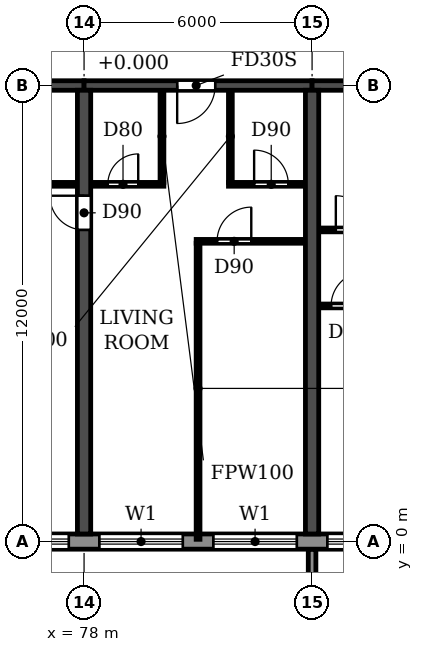
"""IFC4 building model, lengths in metres.
Left out: names, types, materials, properties, quantities, classifications, styles, units other than length and angle.
Written with IfcOpenShell. Run it as: python <this file> out.ifc"""

import sys

from ifc_helpers import new_model, si_unit, direction, frame, frame_2d, origin, place, context, subcontext, project, spatial, polyline, rectangle, outline, extrude, source, transform, mapped, element, fill, save


model = new_model("IFC4")
c1 = context("Model", 3, precision=1e-05, world=origin(), true_north=direction((0.0, 1.0)))
c2 = subcontext(c1, "Body", "Model", "MODEL_VIEW")
j1 = project(units=[si_unit("LENGTHUNIT", "METRE"), si_unit("PLANEANGLEUNIT", "RADIAN")], contexts=[c1])
p1 = place(None, origin())
s1 = spatial("IfcSite", under=j1, at=p1, CompositionType="ELEMENT")
p2 = place(p1, origin())
s2 = spatial("IfcBuilding", under=s1, at=p2, CompositionType="ELEMENT")
p3 = place(p2, frame((0.0, 0.0, 102.6)))
s3 = spatial("IfcBuildingStorey", under=s2, at=p3, CompositionType="ELEMENT", Elevation=102.6)
p4 = place(p3, frame((78.0, 0.2, 0.0), z_axis=(0.0, 0.0, 1.0), x_axis=(0.0, 1.0, 0.0)))
e1 = element("IfcWall", 1, at=p4, inside=s3, PredefinedType="SHEAR", context=c2, shape_type="SweptSolid", body=[
    extrude(rectangle(XDim=11.675, YDim=0.35, at=frame_2d((5.837, 0.0))), origin(), (0.0, 0.0, 1.0), 3.0),
])
p5 = place(p4, frame((8.0, 0.0, 0.0)))
e2 = element("IfcOpeningElement", 2, at=p5, cuts=e1, PredefinedType="OPENING", context=c2, shape_type="SweptSolid", body=[
    extrude(rectangle(XDim=0.9, YDim=2.1, at=frame_2d((0.45, 1.05))), frame((0.0, 0.185, 0.0), z_axis=(0.0, -1.0, 0.0), x_axis=(1.0, 0.0, 0.0)), (0.0, 0.0, 1.0), 0.37),
])
p6 = place(p3, frame((84.0, 0.2, 0.0), z_axis=(0.0, 0.0, 1.0), x_axis=(0.0, 1.0, 0.0)))
e3 = element("IfcWall", 3, at=p6, inside=s3, PredefinedType="SHEAR", context=c2, shape_type="SweptSolid", body=[
    extrude(rectangle(XDim=11.675, YDim=0.35, at=frame_2d((5.837, 0.0))), origin(), (0.0, 0.0, 1.0), 3.0),
])
p7 = place(p3, frame((72.0, 12.0, 0.0), z_axis=(0.0, 0.0, 1.0), x_axis=(1.0, 0.0, 0.0)))
e4 = element("IfcWall", 4, at=p7, inside=s3, PredefinedType="SHEAR", context=c2, shape_type="SweptSolid", body=[
    extrude(rectangle(XDim=6.0, YDim=0.25, at=frame_2d((3.0, 0.0))), origin(), (0.0, 0.0, 1.0), 2.4),
])
p8 = place(p3, frame((78.0, 12.0, 0.0), z_axis=(0.0, 0.0, 1.0), x_axis=(1.0, 0.0, 0.0)))
e5 = element("IfcWall", 5, at=p8, inside=s3, PredefinedType="SHEAR", context=c2, shape_type="SweptSolid", body=[
    extrude(rectangle(XDim=6.0, YDim=0.25, at=frame_2d((3.0, 0.0))), origin(), (0.0, 0.0, 1.0), 2.4),
])
p9 = place(p8, frame((2.45, 0.0, 0.0)))
e6 = element("IfcOpeningElement", 6, at=p9, cuts=e5, PredefinedType="OPENING", context=c2, shape_type="SweptSolid", body=[
    extrude(rectangle(XDim=1.0, YDim=2.1, at=frame_2d((0.5, 1.05))), frame((0.0, 0.135, 0.0), z_axis=(0.0, -1.0, 0.0), x_axis=(1.0, 0.0, 0.0)), (0.0, 0.0, 1.0), 0.27),
])
p10 = place(p3, frame((84.0, 12.0, 0.0), z_axis=(0.0, 0.0, 1.0), x_axis=(1.0, 0.0, 0.0)))
e7 = element("IfcWall", 7, at=p10, inside=s3, PredefinedType="SHEAR", context=c2, shape_type="SweptSolid", body=[
    extrude(rectangle(XDim=6.0, YDim=0.25, at=frame_2d((3.0, 0.0))), origin(), (0.0, 0.0, 1.0), 2.4),
])
p11 = place(p10, frame((2.55, 0.0, 0.0)))
e8 = element("IfcOpeningElement", 8, at=p11, cuts=e7, PredefinedType="OPENING", context=c2, shape_type="SweptSolid", body=[
    extrude(rectangle(XDim=1.0, YDim=2.1, at=frame_2d((0.5, 1.05))), frame((0.0, 0.135, 0.0), z_axis=(0.0, -1.0, 0.0), x_axis=(1.0, 0.0, 0.0)), (0.0, 0.0, 1.0), 0.27),
])
p12 = place(p3, frame((10.683, 0.0, 0.0), z_axis=(0.0, 0.0, 1.0), x_axis=(1.0, 0.0, 0.0)))
e9 = element("IfcWall", 9, at=p12, inside=s3, PredefinedType="STANDARD", context=c2, shape_type="SweptSolid", body=[
    extrude(rectangle(XDim=80.634, YDim=0.4, at=frame_2d((40.317, 0.0))), origin(), (0.0, 0.0, 1.0), 3.0),
])
p13 = place(p12, frame((1.717, 0.0, 0.9)))
e10 = element("IfcOpeningElement", 10, at=p13, cuts=e9, PredefinedType="OPENING", context=c2, shape_type="SweptSolid", body=[
    extrude(rectangle(XDim=2.2, YDim=1.5, at=frame_2d((1.1, 0.75))), frame((0.0, 0.21, 0.0), z_axis=(0.0, -1.0, 0.0), x_axis=(1.0, 0.0, 0.0)), (0.0, 0.0, 1.0), 0.42),
])
p14 = place(p12, frame((4.917, 0.0, 0.0)))
e11 = element("IfcOpeningElement", 11, at=p14, cuts=e9, PredefinedType="OPENING", context=c2, shape_type="SweptSolid", body=[
    extrude(rectangle(XDim=1.8, YDim=2.4, at=frame_2d((0.9, 1.2))), frame((0.0, 0.21, 0.0), z_axis=(0.0, -1.0, 0.0), x_axis=(1.0, 0.0, 0.0)), (0.0, 0.0, 1.0), 0.42),
])
p15 = place(p12, frame((7.717, 0.0, 0.9)))
e12 = element("IfcOpeningElement", 12, at=p15, cuts=e9, PredefinedType="OPENING", context=c2, shape_type="SweptSolid", body=[
    extrude(rectangle(XDim=2.2, YDim=1.5, at=frame_2d((1.1, 0.75))), frame((0.0, 0.21, 0.0), z_axis=(0.0, -1.0, 0.0), x_axis=(1.0, 0.0, 0.0)), (0.0, 0.0, 1.0), 0.42),
])
p16 = place(p12, frame((10.717, 0.0, 0.9)))
e13 = element("IfcOpeningElement", 13, at=p16, cuts=e9, PredefinedType="OPENING", context=c2, shape_type="SweptSolid", body=[
    extrude(rectangle(XDim=2.2, YDim=1.5, at=frame_2d((1.1, 0.75))), frame((0.0, 0.21, 0.0), z_axis=(0.0, -1.0, 0.0), x_axis=(1.0, 0.0, 0.0)), (0.0, 0.0, 1.0), 0.42),
])
p17 = place(p12, frame((13.717, 0.0, 0.9)))
e14 = element("IfcOpeningElement", 14, at=p17, cuts=e9, PredefinedType="OPENING", context=c2, shape_type="SweptSolid", body=[
    extrude(rectangle(XDim=2.2, YDim=1.5, at=frame_2d((1.1, 0.75))), frame((0.0, 0.21, 0.0), z_axis=(0.0, -1.0, 0.0), x_axis=(1.0, 0.0, 0.0)), (0.0, 0.0, 1.0), 0.42),
])
p18 = place(p12, frame((16.717, 0.0, 0.9)))
e15 = element("IfcOpeningElement", 15, at=p18, cuts=e9, PredefinedType="OPENING", context=c2, shape_type="SweptSolid", body=[
    extrude(rectangle(XDim=2.2, YDim=1.5, at=frame_2d((1.1, 0.75))), frame((0.0, 0.21, 0.0), z_axis=(0.0, -1.0, 0.0), x_axis=(1.0, 0.0, 0.0)), (0.0, 0.0, 1.0), 0.42),
])
p19 = place(p12, frame((19.717, 0.0, 0.9)))
e16 = element("IfcOpeningElement", 16, at=p19, cuts=e9, PredefinedType="OPENING", context=c2, shape_type="SweptSolid", body=[
    extrude(rectangle(XDim=2.2, YDim=1.5, at=frame_2d((1.1, 0.75))), frame((0.0, 0.21, 0.0), z_axis=(0.0, -1.0, 0.0), x_axis=(1.0, 0.0, 0.0)), (0.0, 0.0, 1.0), 0.42),
])
p20 = place(p12, frame((22.717, 0.0, 0.9)))
e17 = element("IfcOpeningElement", 17, at=p20, cuts=e9, PredefinedType="OPENING", context=c2, shape_type="SweptSolid", body=[
    extrude(rectangle(XDim=2.2, YDim=1.5, at=frame_2d((1.1, 0.75))), frame((0.0, 0.21, 0.0), z_axis=(0.0, -1.0, 0.0), x_axis=(1.0, 0.0, 0.0)), (0.0, 0.0, 1.0), 0.42),
])
p21 = place(p12, frame((25.717, 0.0, 0.9)))
e18 = element("IfcOpeningElement", 18, at=p21, cuts=e9, PredefinedType="OPENING", context=c2, shape_type="SweptSolid", body=[
    extrude(rectangle(XDim=2.2, YDim=1.5, at=frame_2d((1.1, 0.75))), frame((0.0, 0.21, 0.0), z_axis=(0.0, -1.0, 0.0), x_axis=(1.0, 0.0, 0.0)), (0.0, 0.0, 1.0), 0.42),
])
p22 = place(p12, frame((28.917, 0.0, 0.0)))
e19 = element("IfcOpeningElement", 19, at=p22, cuts=e9, PredefinedType="OPENING", context=c2, shape_type="SweptSolid", body=[
    extrude(rectangle(XDim=1.8, YDim=2.4, at=frame_2d((0.9, 1.2))), frame((0.0, 0.21, 0.0), z_axis=(0.0, -1.0, 0.0), x_axis=(1.0, 0.0, 0.0)), (0.0, 0.0, 1.0), 0.42),
])
p23 = place(p12, frame((31.717, 0.0, 0.9)))
e20 = element("IfcOpeningElement", 20, at=p23, cuts=e9, PredefinedType="OPENING", context=c2, shape_type="SweptSolid", body=[
    extrude(rectangle(XDim=2.2, YDim=1.5, at=frame_2d((1.1, 0.75))), frame((0.0, 0.21, 0.0), z_axis=(0.0, -1.0, 0.0), x_axis=(1.0, 0.0, 0.0)), (0.0, 0.0, 1.0), 0.42),
])
p24 = place(p12, frame((34.717, 0.0, 0.9)))
e21 = element("IfcOpeningElement", 21, at=p24, cuts=e9, PredefinedType="OPENING", context=c2, shape_type="SweptSolid", body=[
    extrude(rectangle(XDim=2.2, YDim=1.5, at=frame_2d((1.1, 0.75))), frame((0.0, 0.21, 0.0), z_axis=(0.0, -1.0, 0.0), x_axis=(1.0, 0.0, 0.0)), (0.0, 0.0, 1.0), 0.42),
])
p25 = place(p12, frame((37.717, 0.0, 0.9)))
e22 = element("IfcOpeningElement", 22, at=p25, cuts=e9, PredefinedType="OPENING", context=c2, shape_type="SweptSolid", body=[
    extrude(rectangle(XDim=2.2, YDim=1.5, at=frame_2d((1.1, 0.75))), frame((0.0, 0.21, 0.0), z_axis=(0.0, -1.0, 0.0), x_axis=(1.0, 0.0, 0.0)), (0.0, 0.0, 1.0), 0.42),
])
p26 = place(p12, frame((40.717, 0.0, 0.9)))
e23 = element("IfcOpeningElement", 23, at=p26, cuts=e9, PredefinedType="OPENING", context=c2, shape_type="SweptSolid", body=[
    extrude(rectangle(XDim=2.2, YDim=1.5, at=frame_2d((1.1, 0.75))), frame((0.0, 0.21, 0.0), z_axis=(0.0, -1.0, 0.0), x_axis=(1.0, 0.0, 0.0)), (0.0, 0.0, 1.0), 0.42),
])
p27 = place(p12, frame((43.717, 0.0, 0.9)))
e24 = element("IfcOpeningElement", 24, at=p27, cuts=e9, PredefinedType="OPENING", context=c2, shape_type="SweptSolid", body=[
    extrude(rectangle(XDim=2.2, YDim=1.5, at=frame_2d((1.1, 0.75))), frame((0.0, 0.21, 0.0), z_axis=(0.0, -1.0, 0.0), x_axis=(1.0, 0.0, 0.0)), (0.0, 0.0, 1.0), 0.42),
])
p28 = place(p12, frame((46.717, 0.0, 0.9)))
e25 = element("IfcOpeningElement", 25, at=p28, cuts=e9, PredefinedType="OPENING", context=c2, shape_type="SweptSolid", body=[
    extrude(rectangle(XDim=2.2, YDim=1.5, at=frame_2d((1.1, 0.75))), frame((0.0, 0.21, 0.0), z_axis=(0.0, -1.0, 0.0), x_axis=(1.0, 0.0, 0.0)), (0.0, 0.0, 1.0), 0.42),
])
p29 = place(p12, frame((49.917, 0.0, 0.0)))
e26 = element("IfcOpeningElement", 26, at=p29, cuts=e9, PredefinedType="OPENING", context=c2, shape_type="SweptSolid", body=[
    extrude(rectangle(XDim=1.8, YDim=2.4, at=frame_2d((0.9, 1.2))), frame((0.0, 0.21, 0.0), z_axis=(0.0, -1.0, 0.0), x_axis=(1.0, 0.0, 0.0)), (0.0, 0.0, 1.0), 0.42),
])
p30 = place(p12, frame((52.717, 0.0, 0.9)))
e27 = element("IfcOpeningElement", 27, at=p30, cuts=e9, PredefinedType="OPENING", context=c2, shape_type="SweptSolid", body=[
    extrude(rectangle(XDim=2.2, YDim=1.5, at=frame_2d((1.1, 0.75))), frame((0.0, 0.21, 0.0), z_axis=(0.0, -1.0, 0.0), x_axis=(1.0, 0.0, 0.0)), (0.0, 0.0, 1.0), 0.42),
])
p31 = place(p12, frame((55.717, 0.0, 0.9)))
e28 = element("IfcOpeningElement", 28, at=p31, cuts=e9, PredefinedType="OPENING", context=c2, shape_type="SweptSolid", body=[
    extrude(rectangle(XDim=2.2, YDim=1.5, at=frame_2d((1.1, 0.75))), frame((0.0, 0.21, 0.0), z_axis=(0.0, -1.0, 0.0), x_axis=(1.0, 0.0, 0.0)), (0.0, 0.0, 1.0), 0.42),
])
p32 = place(p12, frame((58.717, 0.0, 0.9)))
e29 = element("IfcOpeningElement", 29, at=p32, cuts=e9, PredefinedType="OPENING", context=c2, shape_type="SweptSolid", body=[
    extrude(rectangle(XDim=2.2, YDim=1.5, at=frame_2d((1.1, 0.75))), frame((0.0, 0.21, 0.0), z_axis=(0.0, -1.0, 0.0), x_axis=(1.0, 0.0, 0.0)), (0.0, 0.0, 1.0), 0.42),
])
p33 = place(p12, frame((61.717, 0.0, 0.9)))
e30 = element("IfcOpeningElement", 30, at=p33, cuts=e9, PredefinedType="OPENING", context=c2, shape_type="SweptSolid", body=[
    extrude(rectangle(XDim=2.2, YDim=1.5, at=frame_2d((1.1, 0.75))), frame((0.0, 0.21, 0.0), z_axis=(0.0, -1.0, 0.0), x_axis=(1.0, 0.0, 0.0)), (0.0, 0.0, 1.0), 0.42),
])
p34 = place(p12, frame((64.717, 0.0, 0.9)))
e31 = element("IfcOpeningElement", 31, at=p34, cuts=e9, PredefinedType="OPENING", context=c2, shape_type="SweptSolid", body=[
    extrude(rectangle(XDim=2.2, YDim=1.5, at=frame_2d((1.1, 0.75))), frame((0.0, 0.21, 0.0), z_axis=(0.0, -1.0, 0.0), x_axis=(1.0, 0.0, 0.0)), (0.0, 0.0, 1.0), 0.42),
])
p35 = place(p12, frame((67.717, 0.0, 0.9)))
e32 = element("IfcOpeningElement", 32, at=p35, cuts=e9, PredefinedType="OPENING", context=c2, shape_type="SweptSolid", body=[
    extrude(rectangle(XDim=2.2, YDim=1.5, at=frame_2d((1.1, 0.75))), frame((0.0, 0.21, 0.0), z_axis=(0.0, -1.0, 0.0), x_axis=(1.0, 0.0, 0.0)), (0.0, 0.0, 1.0), 0.42),
])
p36 = place(p12, frame((70.717, 0.0, 0.9)))
e33 = element("IfcOpeningElement", 33, at=p36, cuts=e9, PredefinedType="OPENING", context=c2, shape_type="SweptSolid", body=[
    extrude(rectangle(XDim=2.2, YDim=1.5, at=frame_2d((1.1, 0.75))), frame((0.0, 0.21, 0.0), z_axis=(0.0, -1.0, 0.0), x_axis=(1.0, 0.0, 0.0)), (0.0, 0.0, 1.0), 0.42),
])
p37 = place(p12, frame((73.717, 0.0, 0.9)))
e34 = element("IfcOpeningElement", 34, at=p37, cuts=e9, PredefinedType="OPENING", context=c2, shape_type="SweptSolid", body=[
    extrude(rectangle(XDim=2.2, YDim=1.5, at=frame_2d((1.1, 0.75))), frame((0.0, 0.21, 0.0), z_axis=(0.0, -1.0, 0.0), x_axis=(1.0, 0.0, 0.0)), (0.0, 0.0, 1.0), 0.42),
])
p38 = place(p12, frame((76.917, 0.0, 0.0)))
e35 = element("IfcOpeningElement", 35, at=p38, cuts=e9, PredefinedType="OPENING", context=c2, shape_type="SweptSolid", body=[
    extrude(rectangle(XDim=1.8, YDim=2.4, at=frame_2d((0.9, 1.2))), frame((0.0, 0.21, 0.0), z_axis=(0.0, -1.0, 0.0), x_axis=(1.0, 0.0, 0.0)), (0.0, 0.0, 1.0), 0.42),
])
m1 = source(origin(), c2, "Body", "SweptSolid", [
    extrude(outline(polyline([(0.0, 0.0), (0.2, 0.0), (0.2, 1.65), (0.0, 1.65), (0.0, 0.0)])), origin(), (0.0, 0.0, 1.0), 3.1),
])
p39 = place(p3, frame((83.9, -1.85, 0.0)))
e36 = element("IfcWall", 36, at=p39, inside=s3, PredefinedType="STANDARD", context=c2, shape_type="MappedRepresentation", body=[
    mapped(m1, transform((0.0, 0.0, 0.0))),
])
p40 = place(p3, frame((84.185, 6.2, 0.0), z_axis=(0.0, 0.0, 1.0), x_axis=(1.0, 0.0, 0.0)))
e37 = element("IfcWall", 37, at=p40, inside=s3, PredefinedType="PARTITIONING", context=c2, shape_type="SweptSolid", body=[
    extrude(rectangle(XDim=2.865, YDim=0.1, at=frame_2d((1.433, 0.0))), origin(), (0.0, 0.0, 1.0), 3.0),
])
p41 = place(p40, frame((0.315, 0.0, 0.0)))
e38 = element("IfcOpeningElement", 38, at=p41, cuts=e37, PredefinedType="OPENING", context=c2, shape_type="SweptSolid", body=[
    extrude(rectangle(XDim=0.9, YDim=2.1, at=frame_2d((0.45, 1.05))), frame((0.0, 0.06, 0.0), z_axis=(0.0, -1.0, 0.0), x_axis=(1.0, 0.0, 0.0)), (0.0, 0.0, 1.0), 0.12),
])
p42 = place(p3, frame((80.95, 7.9, 0.0), z_axis=(0.0, 0.0, 1.0), x_axis=(1.0, 0.0, 0.0)))
e39 = element("IfcWall", 39, at=p42, inside=s3, PredefinedType="PARTITIONING", context=c2, shape_type="SweptSolid", body=[
    extrude(rectangle(XDim=2.865, YDim=0.1, at=frame_2d((1.433, 0.0))), origin(), (0.0, 0.0, 1.0), 3.0),
])
p43 = place(p42, frame((0.55, 0.0, 0.0)))
e40 = element("IfcOpeningElement", 40, at=p43, cuts=e39, PredefinedType="OPENING", context=c2, shape_type="SweptSolid", body=[
    extrude(rectangle(XDim=0.9, YDim=2.1, at=frame_2d((0.45, 1.05))), frame((0.0, 0.06, 0.0), z_axis=(0.0, -1.0, 0.0), x_axis=(1.0, 0.0, 0.0)), (0.0, 0.0, 1.0), 0.12),
])
p44 = place(p3, frame((84.185, 8.2, 0.0), z_axis=(0.0, 0.0, 1.0), x_axis=(1.0, 0.0, 0.0)))
e41 = element("IfcWall", 41, at=p44, inside=s3, PredefinedType="PARTITIONING", context=c2, shape_type="SweptSolid", body=[
    extrude(rectangle(XDim=2.015, YDim=0.1, at=frame_2d((1.007, 0.0))), origin(), (0.0, 0.0, 1.0), 3.0),
])
p45 = place(p44, frame((0.44, 0.0, 0.0)))
e42 = element("IfcOpeningElement", 42, at=p45, cuts=e41, PredefinedType="OPENING", context=c2, shape_type="SweptSolid", body=[
    extrude(rectangle(XDim=0.9, YDim=2.1, at=frame_2d((0.45, 1.05))), frame((0.0, 0.06, 0.0), z_axis=(0.0, -1.0, 0.0), x_axis=(1.0, 0.0, 0.0)), (0.0, 0.0, 1.0), 0.12),
])
p46 = place(p3, frame((75.1, 9.4, 0.0), z_axis=(0.0, 0.0, 1.0), x_axis=(1.0, 0.0, 0.0)))
e43 = element("IfcWall", 43, at=p46, inside=s3, PredefinedType="PARTITIONING", context=c2, shape_type="SweptSolid", body=[
    extrude(rectangle(XDim=2.715, YDim=0.1, at=frame_2d((1.357, 0.0))), origin(), (0.0, 0.0, 1.0), 3.0),
])
p47 = place(p46, frame((1.0, 0.0, 0.0)))
e44 = element("IfcOpeningElement", 44, at=p47, cuts=e43, PredefinedType="OPENING", context=c2, shape_type="SweptSolid", body=[
    extrude(rectangle(XDim=0.8, YDim=2.1, at=frame_2d((0.4, 1.05))), frame((0.0, 0.06, 0.0), z_axis=(0.0, -1.0, 0.0), x_axis=(1.0, 0.0, 0.0)), (0.0, 0.0, 1.0), 0.12),
])
p48 = place(p3, frame((78.185, 9.4, 0.0), z_axis=(0.0, 0.0, 1.0), x_axis=(1.0, 0.0, 0.0)))
e45 = element("IfcWall", 45, at=p48, inside=s3, PredefinedType="PARTITIONING", context=c2, shape_type="SweptSolid", body=[
    extrude(rectangle(XDim=1.915, YDim=0.1, at=frame_2d((0.958, 0.0))), origin(), (0.0, 0.0, 1.0), 3.0),
])
p49 = place(p48, frame((0.44, 0.0, 0.0)))
e46 = element("IfcOpeningElement", 46, at=p49, cuts=e45, PredefinedType="OPENING", context=c2, shape_type="SweptSolid", body=[
    extrude(rectangle(XDim=0.8, YDim=2.1, at=frame_2d((0.4, 1.05))), frame((0.0, 0.06, 0.0), z_axis=(0.0, -1.0, 0.0), x_axis=(1.0, 0.0, 0.0)), (0.0, 0.0, 1.0), 0.12),
])
p50 = place(p3, frame((81.8, 9.4, 0.0), z_axis=(0.0, 0.0, 1.0), x_axis=(1.0, 0.0, 0.0)))
e47 = element("IfcWall", 47, at=p50, inside=s3, PredefinedType="PARTITIONING", context=c2, shape_type="SweptSolid", body=[
    extrude(rectangle(XDim=2.015, YDim=0.1, at=frame_2d((1.007, 0.0))), origin(), (0.0, 0.0, 1.0), 3.0),
])
p51 = place(p50, frame((0.675, 0.0, 0.0)))
e48 = element("IfcOpeningElement", 48, at=p51, cuts=e47, PredefinedType="OPENING", context=c2, shape_type="SweptSolid", body=[
    extrude(rectangle(XDim=0.9, YDim=2.1, at=frame_2d((0.45, 1.05))), frame((0.0, 0.06, 0.0), z_axis=(0.0, -1.0, 0.0), x_axis=(1.0, 0.0, 0.0)), (0.0, 0.0, 1.0), 0.12),
])
p52 = place(p3, frame((80.05, 9.45, 0.0), z_axis=(0.0, 0.0, 1.0), x_axis=(0.0, 1.0, 0.0)))
e49 = element("IfcWall", 49, at=p52, inside=s3, PredefinedType="PARTITIONING", context=c2, shape_type="SweptSolid", body=[
    extrude(rectangle(XDim=2.415, YDim=0.1, at=frame_2d((1.208, 0.0))), origin(), (0.0, 0.0, 1.0), 3.0),
])
p53 = place(p3, frame((81.0, 0.06, 0.0), z_axis=(0.0, 0.0, 1.0), x_axis=(0.0, 1.0, 0.0)))
e50 = element("IfcWall", 50, at=p53, inside=s3, PredefinedType="PARTITIONING", context=c2, shape_type="SweptSolid", body=[
    extrude(rectangle(XDim=7.79, YDim=0.1, at=frame_2d((3.895, 0.0))), origin(), (0.0, 0.0, 1.0), 3.0),
])
p54 = place(p3, frame((81.85, 9.45, 0.0), z_axis=(0.0, 0.0, 1.0), x_axis=(0.0, 1.0, 0.0)))
e51 = element("IfcWall", 51, at=p54, inside=s3, PredefinedType="PARTITIONING", context=c2, shape_type="SweptSolid", body=[
    extrude(rectangle(XDim=2.415, YDim=0.1, at=frame_2d((1.208, 0.0))), origin(), (0.0, 0.0, 1.0), 3.0),
])
p55 = place(p34, origin())
e52 = element("IfcWindow", 52, at=p55, inside=s3, PartitioningType="DOUBLE_PANEL_HORIZONTAL", PredefinedType="WINDOW", context=c2, shape_type="SweptSolid", body=[
    extrude(rectangle(XDim=2.2, YDim=1.5, at=frame_2d((1.1, 0.75))), frame((0.0, 0.03, 0.0), z_axis=(0.0, -1.0, 0.0), x_axis=(1.0, 0.0, 0.0)), (0.0, 0.0, 1.0), 0.06),
])
fill(e31, e52)
p56 = place(p35, origin())
e53 = element("IfcWindow", 53, at=p56, inside=s3, PartitioningType="DOUBLE_PANEL_HORIZONTAL", PredefinedType="WINDOW", context=c2, shape_type="SweptSolid", body=[
    extrude(rectangle(XDim=2.2, YDim=1.5, at=frame_2d((1.1, 0.75))), frame((0.0, 0.03, 0.0), z_axis=(0.0, -1.0, 0.0), x_axis=(1.0, 0.0, 0.0)), (0.0, 0.0, 1.0), 0.06),
])
fill(e32, e53)
p57 = place(p36, origin())
e54 = element("IfcWindow", 54, at=p57, inside=s3, PartitioningType="DOUBLE_PANEL_HORIZONTAL", PredefinedType="WINDOW", context=c2, shape_type="SweptSolid", body=[
    extrude(rectangle(XDim=2.2, YDim=1.5, at=frame_2d((1.1, 0.75))), frame((0.0, 0.03, 0.0), z_axis=(0.0, -1.0, 0.0), x_axis=(1.0, 0.0, 0.0)), (0.0, 0.0, 1.0), 0.06),
])
fill(e33, e54)
p58 = place(p37, origin())
e55 = element("IfcWindow", 55, at=p58, inside=s3, PartitioningType="DOUBLE_PANEL_HORIZONTAL", PredefinedType="WINDOW", context=c2, shape_type="SweptSolid", body=[
    extrude(rectangle(XDim=2.2, YDim=1.5, at=frame_2d((1.1, 0.75))), frame((0.0, 0.03, 0.0), z_axis=(0.0, -1.0, 0.0), x_axis=(1.0, 0.0, 0.0)), (0.0, 0.0, 1.0), 0.06),
])
fill(e34, e55)
p59 = place(p5, origin())
e56 = element("IfcDoor", 56, at=p59, inside=s3, OperationType="SINGLE_SWING_RIGHT", PredefinedType="DOOR", context=c2, shape_type="SweptSolid", body=[
    extrude(rectangle(XDim=0.9, YDim=2.1, at=frame_2d((0.45, 1.05))), frame((0.0, 0.025, 0.0), z_axis=(0.0, -1.0, 0.0), x_axis=(1.0, 0.0, 0.0)), (0.0, 0.0, 1.0), 0.05),
])
fill(e2, e56)
p60 = place(p49, origin())
e57 = element("IfcDoor", 57, at=p60, inside=s3, OperationType="SINGLE_SWING_RIGHT", PredefinedType="DOOR", context=c2, shape_type="SweptSolid", body=[
    extrude(rectangle(XDim=0.8, YDim=2.1, at=frame_2d((0.4, 1.05))), frame((0.0, 0.025, 0.0), z_axis=(0.0, -1.0, 0.0), x_axis=(1.0, 0.0, 0.0)), (0.0, 0.0, 1.0), 0.05),
])
fill(e46, e57)
p61 = place(p9, frame((1.0, 0.0, 0.0), z_axis=(0.0, 0.0, 1.0), x_axis=(-1.0, 0.0, 0.0)))
e58 = element("IfcDoor", 58, at=p61, inside=s3, OperationType="SINGLE_SWING_RIGHT", PredefinedType="DOOR", context=c2, shape_type="SweptSolid", body=[
    extrude(rectangle(XDim=1.0, YDim=2.1, at=frame_2d((0.5, 1.05))), frame((0.0, 0.025, 0.0), z_axis=(0.0, -1.0, 0.0), x_axis=(1.0, 0.0, 0.0)), (0.0, 0.0, 1.0), 0.05),
])
fill(e6, e58)
p62 = place(p43, origin())
e59 = element("IfcDoor", 59, at=p62, inside=s3, OperationType="SINGLE_SWING_RIGHT", PredefinedType="DOOR", context=c2, shape_type="SweptSolid", body=[
    extrude(rectangle(XDim=0.9, YDim=2.1, at=frame_2d((0.45, 1.05))), frame((0.0, 0.025, 0.0), z_axis=(0.0, -1.0, 0.0), x_axis=(1.0, 0.0, 0.0)), (0.0, 0.0, 1.0), 0.05),
])
fill(e40, e59)
p63 = place(p51, origin())
e60 = element("IfcDoor", 60, at=p63, inside=s3, OperationType="SINGLE_SWING_LEFT", PredefinedType="DOOR", context=c2, shape_type="SweptSolid", body=[
    extrude(rectangle(XDim=0.9, YDim=2.1, at=frame_2d((0.45, 1.05))), frame((0.0, 0.025, 0.0), z_axis=(0.0, -1.0, 0.0), x_axis=(1.0, 0.0, 0.0)), (0.0, 0.0, 1.0), 0.05),
])
fill(e48, e60)
p64 = place(p41, origin())
e61 = element("IfcDoor", 61, at=p64, inside=s3, OperationType="SINGLE_SWING_RIGHT", PredefinedType="DOOR", context=c2, shape_type="SweptSolid", body=[
    extrude(rectangle(XDim=0.9, YDim=2.1, at=frame_2d((0.45, 1.05))), frame((0.0, 0.025, 0.0), z_axis=(0.0, -1.0, 0.0), x_axis=(1.0, 0.0, 0.0)), (0.0, 0.0, 1.0), 0.05),
])
fill(e38, e61)
p65 = place(p45, origin())
e62 = element("IfcDoor", 62, at=p65, inside=s3, OperationType="SINGLE_SWING_LEFT", PredefinedType="DOOR", context=c2, shape_type="SweptSolid", body=[
    extrude(rectangle(XDim=0.9, YDim=2.1, at=frame_2d((0.45, 1.05))), frame((0.0, 0.025, 0.0), z_axis=(0.0, -1.0, 0.0), x_axis=(1.0, 0.0, 0.0)), (0.0, 0.0, 1.0), 0.05),
])
fill(e42, e62)
save(model, sys.argv[1])
